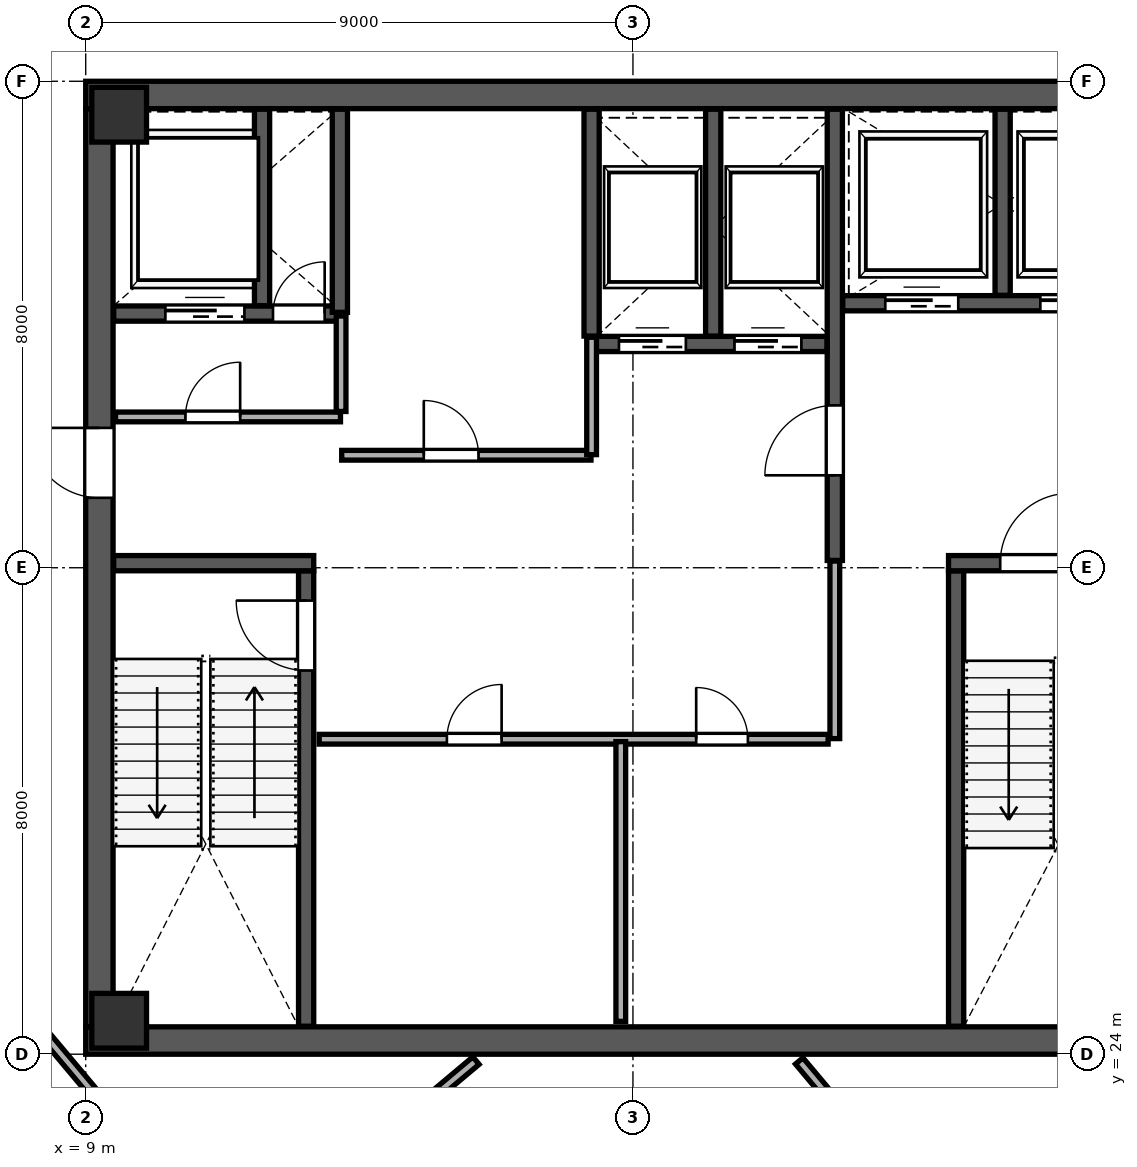
"""IFC4 building model, lengths in metres.
Left out: names, types, materials, properties, quantities, classifications, styles, units other than length and angle.
Written with IfcOpenShell. Run it as: python <this file> out.ifc"""

import sys

from ifc_helpers import new_model, si_unit, direction, frame, frame_2d, origin, origin_2d, place, context, subcontext, project, spatial, rectangle, extrude, source, transform, mapped, element, fill, save


model = new_model("IFC4")
c1 = context("Model", 3, precision=1e-05, world=origin(), true_north=direction((0.0, 1.0)))
c2 = subcontext(c1, "Body", "Model", "MODEL_VIEW")
j1 = project(units=[si_unit("LENGTHUNIT", "METRE"), si_unit("PLANEANGLEUNIT", "RADIAN")], contexts=[c1])
p1 = place(None, origin())
s1 = spatial("IfcSite", under=j1, at=p1, CompositionType="ELEMENT")
p2 = place(p1, origin())
s2 = spatial("IfcBuilding", under=s1, at=p2, CompositionType="ELEMENT")
p3 = place(p2, frame((0.0, 0.0, 271.0)))
s3 = spatial("IfcBuildingStorey", under=s2, at=p3, CompositionType="ELEMENT", Elevation=271.0)
m1 = source(origin(), c2, "Body", "SweptSolid", [
    extrude(rectangle(XDim=0.9, YDim=0.9, at=origin_2d()), origin(), (0.0, 0.0, 1.0), 4.198),
])
for number, where, z_axis, x_axis in (
    (1, (9.55, 24.55, 0.001), (0.0, 0.0, 1.0), (1.0, 0.0, 0.0)),
    (2, (9.55, 39.45, 0.001), (0.0, 0.0, 1.0), (1.0, 0.0, 0.0)),
):
    element("IfcColumn", number, at=place(p3, frame(where, z_axis=z_axis, x_axis=x_axis)), inside=s3, PredefinedType="COLUMN", context=c2, shape_type="MappedRepresentation", body=[
        mapped(m1, transform((0.0, 0.0, 0.0), scale=1.0)),
    ])
p4 = place(p3, frame((9.225, 24.45, 0.0), z_axis=(0.0, 0.0, 1.0), x_axis=(0.0, 1.0, 0.0)))
e3 = element("IfcWall", 3, at=p4, inside=s3, PredefinedType="SHEAR", context=c2, shape_type="SweptSolid", body=[
    extrude(rectangle(XDim=15.1, YDim=0.45, at=frame_2d((7.55, 0.0))), origin(), (0.0, 0.0, 1.0), 3.96),
])
p5 = place(p4, frame((8.7, 0.0, 0.0)))
e4 = element("IfcOpeningElement", 4, at=p5, cuts=e3, PredefinedType="OPENING", context=c2, shape_type="SweptSolid", body=[
    extrude(rectangle(XDim=1.15, YDim=2.2, at=frame_2d((0.575, 1.1))), frame((0.0, 0.235, 0.0), z_axis=(0.0, -1.0, 0.0), x_axis=(1.0, 0.0, 0.0)), (0.0, 0.0, 1.0), 0.47),
])
for number, where, z_axis, x_axis in (
    (5, (9.0, 24.225, 0.0), (0.0, 0.0, 1.0), (1.0, 0.0, 0.0)),
    (6, (9.0, 39.775, 0.0), (0.0, 0.0, 1.0), (1.0, 0.0, 0.0)),
):
    element("IfcWall", number, at=place(p3, frame(where, z_axis=z_axis, x_axis=x_axis)), inside=s3, PredefinedType="SHEAR", context=c2, shape_type="SweptSolid", body=[
        extrude(rectangle(XDim=18.0, YDim=0.45, at=frame_2d((9.0, 0.0))), origin(), (0.0, 0.0, 1.0), 3.96),
    ])
p6 = place(p3, frame((12.625, 24.46, 0.0), z_axis=(0.0, 0.0, 1.0), x_axis=(0.0, 1.0, 0.0)))
e7 = element("IfcWall", 7, at=p6, inside=s3, PredefinedType="SHEAR", context=c2, shape_type="SweptSolid", body=[
    extrude(rectangle(XDim=7.49, YDim=0.25, at=frame_2d((3.745, 0.0))), origin(), (0.0, 0.0, 1.0), 3.96),
])
p7 = place(p6, frame((5.85, 0.0, 0.0)))
e8 = element("IfcOpeningElement", 8, at=p7, cuts=e7, PredefinedType="OPENING", context=c2, shape_type="SweptSolid", body=[
    extrude(rectangle(XDim=1.15, YDim=2.2, at=frame_2d((0.575, 1.1))), frame((0.0, 0.135, 0.0), z_axis=(0.0, -1.0, 0.0), x_axis=(1.0, 0.0, 0.0)), (0.0, 0.0, 1.0), 0.27),
])
p8 = place(p3, frame((9.46, 32.075, 0.0), z_axis=(0.0, 0.0, 1.0), x_axis=(1.0, 0.0, 0.0)))
e9 = element("IfcWall", 9, at=p8, inside=s3, PredefinedType="SHEAR", context=c2, shape_type="SweptSolid", body=[
    extrude(rectangle(XDim=3.29, YDim=0.25, at=frame_2d((1.645, 0.0))), origin(), (0.0, 0.0, 1.0), 3.96),
])
p9 = place(p3, frame((23.315, 24.46, 0.0), z_axis=(0.0, 0.0, 1.0), x_axis=(0.0, 1.0, 0.0)))
e10 = element("IfcWall", 10, at=p9, inside=s3, PredefinedType="SHEAR", context=c2, shape_type="SweptSolid", body=[
    extrude(rectangle(XDim=7.49, YDim=0.25, at=frame_2d((3.745, 0.0))), origin(), (0.0, 0.0, 1.0), 3.96),
])
p10 = place(p3, frame((23.19, 32.075, 0.0), z_axis=(0.0, 0.0, 1.0), x_axis=(1.0, 0.0, 0.0)))
e11 = element("IfcWall", 11, at=p10, inside=s3, PredefinedType="SHEAR", context=c2, shape_type="SweptSolid", body=[
    extrude(rectangle(XDim=3.35, YDim=0.25, at=frame_2d((1.675, 0.0))), origin(), (0.0, 0.0, 1.0), 3.96),
])
p11 = place(p10, frame((0.85, 0.0, 0.0)))
e12 = element("IfcOpeningElement", 12, at=p11, cuts=e11, PredefinedType="OPENING", context=c2, shape_type="SweptSolid", body=[
    extrude(rectangle(XDim=1.15, YDim=2.2, at=frame_2d((0.575, 1.1))), frame((0.0, 0.135, 0.0), z_axis=(0.0, -1.0, 0.0), x_axis=(1.0, 0.0, 0.0)), (0.0, 0.0, 1.0), 0.27),
])
p12 = place(p3, frame((21.32, 32.12, 0.0), z_axis=(0.0, 0.0, 1.0), x_axis=(0.0, 1.0, 0.0)))
e13 = element("IfcWall", 13, at=p12, inside=s3, PredefinedType="SHEAR", context=c2, shape_type="SweptSolid", body=[
    extrude(rectangle(XDim=7.42, YDim=0.25, at=frame_2d((3.71, 0.0))), origin(), (0.0, 0.0, 1.0), 3.96),
])
p13 = place(p12, frame((1.4, 0.0, 0.0)))
e14 = element("IfcOpeningElement", 14, at=p13, cuts=e13, PredefinedType="OPENING", context=c2, shape_type="SweptSolid", body=[
    extrude(rectangle(XDim=1.15, YDim=2.2, at=frame_2d((0.575, 1.1))), frame((0.0, 0.135, 0.0), z_axis=(0.0, -1.0, 0.0), x_axis=(1.0, 0.0, 0.0)), (0.0, 0.0, 1.0), 0.27),
])
p14 = place(p3, frame((9.46, 36.18, 0.0), z_axis=(0.0, 0.0, 1.0), x_axis=(1.0, 0.0, 0.0)))
e15 = element("IfcWall", 15, at=p14, inside=s3, PredefinedType="SHEAR", context=c2, shape_type="SweptSolid", body=[
    extrude(rectangle(XDim=3.79, YDim=0.25, at=frame_2d((1.895, 0.0))), origin(), (0.0, 0.0, 1.0), 3.96),
])
p15 = place(p14, frame((2.62, 0.0, 0.0)))
e16 = element("IfcOpeningElement", 16, at=p15, cuts=e15, PredefinedType="OPENING", context=c2, shape_type="SweptSolid", body=[
    extrude(rectangle(XDim=0.85, YDim=2.1, at=frame_2d((0.425, 1.05))), frame((0.0, 0.135, 0.0), z_axis=(0.0, -1.0, 0.0), x_axis=(1.0, 0.0, 0.0)), (0.0, 0.0, 1.0), 0.27),
])
p16 = place(p14, frame((0.85, 0.0, 0.0)))
e17 = element("IfcOpeningElement", 17, at=p16, cuts=e15, PredefinedType="OPENING", context=c2, shape_type="SweptSolid", body=[
    extrude(rectangle(XDim=1.3, YDim=2.25, at=frame_2d((0.65, 1.125))), frame((0.0, 0.135, 0.0), z_axis=(0.0, -1.0, 0.0), x_axis=(1.0, 0.0, 0.0)), (0.0, 0.0, 1.0), 0.27),
])
p17 = place(p3, frame((11.9, 36.31, 0.0), z_axis=(0.0, 0.0, 1.0), x_axis=(0.0, 1.0, 0.0)))
e18 = element("IfcWall", 18, at=p17, inside=s3, PredefinedType="SHEAR", context=c2, shape_type="SweptSolid", body=[
    extrude(rectangle(XDim=3.23, YDim=0.25, at=frame_2d((1.615, 0.0))), origin(), (0.0, 0.0, 1.0), 3.96),
])
p18 = place(p3, frame((21.45, 36.35, 0.0), z_axis=(0.0, 0.0, 1.0), x_axis=(1.0, 0.0, 0.0)))
e19 = element("IfcWall", 19, at=p18, inside=s3, PredefinedType="SHEAR", context=c2, shape_type="SweptSolid", body=[
    extrude(rectangle(XDim=5.09, YDim=0.25, at=frame_2d((2.545, 0.0))), origin(), (0.0, 0.0, 1.0), 3.96),
])
p19 = place(p18, frame((0.7, 0.0, 0.0)))
e20 = element("IfcOpeningElement", 20, at=p19, cuts=e19, PredefinedType="OPENING", context=c2, shape_type="SweptSolid", body=[
    extrude(rectangle(XDim=1.2, YDim=2.2, at=frame_2d((0.6, 1.1))), frame((0.0, 0.135, 0.0), z_axis=(0.0, -1.0, 0.0), x_axis=(1.0, 0.0, 0.0)), (0.0, 0.0, 1.0), 0.27),
])
p20 = place(p18, frame((3.25, 0.0, 0.0)))
e21 = element("IfcOpeningElement", 21, at=p20, cuts=e19, PredefinedType="OPENING", context=c2, shape_type="SweptSolid", body=[
    extrude(rectangle(XDim=1.2, YDim=2.2, at=frame_2d((0.6, 1.1))), frame((0.0, 0.135, 0.0), z_axis=(0.0, -1.0, 0.0), x_axis=(1.0, 0.0, 0.0)), (0.0, 0.0, 1.0), 0.27),
])
p21 = place(p3, frame((24.08, 36.48, 0.0), z_axis=(0.0, 0.0, 1.0), x_axis=(0.0, 1.0, 0.0)))
e22 = element("IfcWall", 22, at=p21, inside=s3, PredefinedType="SHEAR", context=c2, shape_type="SweptSolid", body=[
    extrude(rectangle(XDim=3.06, YDim=0.25, at=frame_2d((1.53, 0.0))), origin(), (0.0, 0.0, 1.0), 3.96),
])
p22 = place(p3, frame((13.18, 36.2, 0.0), z_axis=(0.0, 0.0, 1.0), x_axis=(0.0, 1.0, 0.0)))
e23 = element("IfcWall", 23, at=p22, inside=s3, PredefinedType="SHEAR", context=c2, shape_type="SweptSolid", body=[
    extrude(rectangle(XDim=3.34, YDim=0.25, at=frame_2d((1.67, 0.0))), origin(), (0.0, 0.0, 1.0), 3.96),
])
p23 = place(p3, frame((17.32, 35.68, 0.0), z_axis=(0.0, 0.0, 1.0), x_axis=(1.0, 0.0, 0.0)))
e24 = element("IfcWall", 24, at=p23, inside=s3, PredefinedType="SHEAR", context=c2, shape_type="SweptSolid", body=[
    extrude(rectangle(XDim=3.87, YDim=0.25, at=frame_2d((1.935, 0.0))), origin(), (0.0, 0.0, 1.0), 3.96),
])
p24 = place(p23, frame((0.45, 0.0, 0.0)))
e25 = element("IfcOpeningElement", 25, at=p24, cuts=e24, PredefinedType="OPENING", context=c2, shape_type="SweptSolid", body=[
    extrude(rectangle(XDim=1.1, YDim=2.2, at=frame_2d((0.55, 1.1))), frame((0.0, 0.135, 0.0), z_axis=(0.0, -1.0, 0.0), x_axis=(1.0, 0.0, 0.0)), (0.0, 0.0, 1.0), 0.27),
])
p25 = place(p23, frame((2.35, 0.0, 0.0)))
e26 = element("IfcOpeningElement", 26, at=p25, cuts=e24, PredefinedType="OPENING", context=c2, shape_type="SweptSolid", body=[
    extrude(rectangle(XDim=1.1, YDim=2.2, at=frame_2d((0.55, 1.1))), frame((0.0, 0.135, 0.0), z_axis=(0.0, -1.0, 0.0), x_axis=(1.0, 0.0, 0.0)), (0.0, 0.0, 1.0), 0.27),
])
for number, where, z_axis, x_axis in (
    (27, (17.32, 35.81, 0.0), (0.0, 0.0, 1.0), (0.0, 1.0, 0.0)),
    (28, (19.32, 35.81, 0.0), (0.0, 0.0, 1.0), (0.0, 1.0, 0.0)),
):
    element("IfcWall", number, at=place(p3, frame(where, z_axis=z_axis, x_axis=x_axis)), inside=s3, PredefinedType="SHEAR", context=c2, shape_type="SweptSolid", body=[
        extrude(rectangle(XDim=3.73, YDim=0.25, at=frame_2d((1.865, 0.0))), origin(), (0.0, 0.0, 1.0), 3.96),
    ])
p26 = place(p3, frame((9.49, 34.48, 0.0), z_axis=(0.0, 0.0, 1.0), x_axis=(1.0, 0.0, 0.0)))
e29 = element("IfcWall", 29, at=p26, inside=s3, PredefinedType="PARTITIONING", context=c2, shape_type="SweptSolid", body=[
    extrude(rectangle(XDim=3.7, YDim=0.16, at=frame_2d((1.85, 0.0))), origin(), (0.0, 0.0, 1.0), 3.96),
])
p27 = place(p26, frame((1.15, 0.0, 0.0)))
e30 = element("IfcOpeningElement", 30, at=p27, cuts=e29, PredefinedType="OPENING", context=c2, shape_type="SweptSolid", body=[
    extrude(rectangle(XDim=0.9, YDim=2.15, at=frame_2d((0.45, 1.075))), frame((0.0, 0.09, 0.0), z_axis=(0.0, -1.0, 0.0), x_axis=(1.0, 0.0, 0.0)), (0.0, 0.0, 1.0), 0.18),
])
p28 = place(p3, frame((13.2, 34.57, 0.0), z_axis=(0.0, 0.0, 1.0), x_axis=(0.0, 1.0, 0.0)))
e31 = element("IfcWall", 31, at=p28, inside=s3, PredefinedType="PARTITIONING", context=c2, shape_type="SweptSolid", body=[
    extrude(rectangle(XDim=1.57, YDim=0.16, at=frame_2d((0.785, 0.0))), origin(), (0.0, 0.0, 1.0), 3.96),
])
p29 = place(p3, frame((13.21, 33.85, 0.0), z_axis=(0.0, 0.0, 1.0), x_axis=(1.0, 0.0, 0.0)))
e32 = element("IfcWall", 32, at=p29, inside=s3, PredefinedType="PARTITIONING", context=c2, shape_type="SweptSolid", body=[
    extrude(rectangle(XDim=4.1, YDim=0.16, at=frame_2d((2.05, 0.0))), origin(), (0.0, 0.0, 1.0), 3.96),
])
p30 = place(p29, frame((1.35, 0.0, 0.0)))
e33 = element("IfcOpeningElement", 33, at=p30, cuts=e32, PredefinedType="OPENING", context=c2, shape_type="SweptSolid", body=[
    extrude(rectangle(XDim=0.9, YDim=2.15, at=frame_2d((0.45, 1.075))), frame((0.0, 0.09, 0.0), z_axis=(0.0, -1.0, 0.0), x_axis=(1.0, 0.0, 0.0)), (0.0, 0.0, 1.0), 0.18),
])
p31 = place(p3, frame((17.32, 33.86, 0.0), z_axis=(0.0, 0.0, 1.0), x_axis=(0.0, 1.0, 0.0)))
e34 = element("IfcWall", 34, at=p31, inside=s3, PredefinedType="PARTITIONING", context=c2, shape_type="SweptSolid", body=[
    extrude(rectangle(XDim=1.93, YDim=0.16, at=frame_2d((0.965, 0.0))), origin(), (0.0, 0.0, 1.0), 3.96),
])
p32 = place(p3, frame((12.84, 29.18, 0.0), z_axis=(0.0, 0.0, 1.0), x_axis=(1.0, 0.0, 0.0)))
e35 = element("IfcWall", 35, at=p32, inside=s3, PredefinedType="PARTITIONING", context=c2, shape_type="SweptSolid", body=[
    extrude(rectangle(XDim=8.37, YDim=0.16, at=frame_2d((4.185, 0.0))), origin(), (0.0, 0.0, 1.0), 3.96),
])
p33 = place(p32, frame((2.1, 0.0, 0.0)))
e36 = element("IfcOpeningElement", 36, at=p33, cuts=e35, PredefinedType="OPENING", context=c2, shape_type="SweptSolid", body=[
    extrude(rectangle(XDim=0.9, YDim=2.15, at=frame_2d((0.45, 1.075))), frame((0.0, 0.09, 0.0), z_axis=(0.0, -1.0, 0.0), x_axis=(1.0, 0.0, 0.0)), (0.0, 0.0, 1.0), 0.18),
])
p34 = place(p32, frame((6.2, 0.0, 0.0)))
e37 = element("IfcOpeningElement", 37, at=p34, cuts=e35, PredefinedType="OPENING", context=c2, shape_type="SweptSolid", body=[
    extrude(rectangle(XDim=0.85, YDim=2.1, at=frame_2d((0.425, 1.05))), frame((0.0, 0.09, 0.0), z_axis=(0.0, -1.0, 0.0), x_axis=(1.0, 0.0, 0.0)), (0.0, 0.0, 1.0), 0.18),
])
p35 = place(p3, frame((17.8, 24.54, 0.0), z_axis=(0.0, 0.0, 1.0), x_axis=(0.0, 1.0, 0.0)))
e38 = element("IfcWall", 38, at=p35, inside=s3, PredefinedType="PARTITIONING", context=c2, shape_type="SweptSolid", body=[
    extrude(rectangle(XDim=4.6, YDim=0.16, at=frame_2d((2.3, 0.0))), origin(), (0.0, 0.0, 1.0), 3.96),
])
p36 = place(p3, frame((21.32, 29.19, 0.0), z_axis=(0.0, 0.0, 1.0), x_axis=(0.0, 1.0, 0.0)))
e39 = element("IfcWall", 39, at=p36, inside=s3, PredefinedType="PARTITIONING", context=c2, shape_type="SweptSolid", body=[
    extrude(rectangle(XDim=2.92, YDim=0.16, at=frame_2d((1.46, 0.0))), origin(), (0.0, 0.0, 1.0), 3.96),
])
p37 = place(p3, frame((4.002, 29.471, 0.0), z_axis=(0.0, 0.0, 1.0), x_axis=(0.642802048813, -0.766032327021, 0.0)))
e40 = element("IfcWall", 40, at=p37, inside=s3, PredefinedType="PARTITIONING", context=c2, shape_type="SweptSolid", body=[
    extrude(rectangle(XDim=11.57, YDim=0.16, at=frame_2d((5.785, 0.0))), origin(), (0.0, 0.0, 1.0), 3.96),
])
p38 = place(p37, frame((1.15, 0.0, 0.0)))
e41 = element("IfcOpeningElement", 41, at=p38, cuts=e40, PredefinedType="OPENING", context=c2, shape_type="SweptSolid", body=[
    extrude(rectangle(XDim=0.95, YDim=2.15, at=frame_2d((0.475, 1.075))), frame((0.0, 0.09, 0.0), z_axis=(0.0, -1.0, 0.0), x_axis=(1.0, 0.0, 0.0)), (0.0, 0.0, 1.0), 0.18),
])
p39 = place(p3, frame((11.495, 20.603, 0.0), z_axis=(0.0, 0.0, 1.0), x_axis=(0.766059769702, 0.642769343734, 0.0)))
e42 = element("IfcWall", 42, at=p39, inside=s3, PredefinedType="PARTITIONING", context=c2, shape_type="SweptSolid", body=[
    extrude(rectangle(XDim=5.121, YDim=0.16, at=frame_2d((2.561, 0.0))), origin(), (0.0, 0.0, 1.0), 3.96),
])
p40 = place(p3, frame((20.734, 23.889, 0.0), z_axis=(0.0, 0.0, 1.0), x_axis=(0.642758145725, -0.766069165353, 0.0)))
e43 = element("IfcWall", 43, at=p40, inside=s3, PredefinedType="PARTITIONING", context=c2, shape_type="SweptSolid", body=[
    extrude(rectangle(XDim=5.609, YDim=0.16, at=frame_2d((2.804, 0.0))), origin(), (0.0, 0.0, 1.0), 3.96),
])
p41 = place(p3, frame((19.528, 51.245, 0.0), z_axis=(0.0, 0.0, 1.0), x_axis=(0.642782364439, -0.766048844374, 0.0)))
e44 = element("IfcWall", 44, at=p41, inside=s3, PredefinedType="PARTITIONING", context=c2, shape_type="SweptSolid", body=[
    extrude(rectangle(XDim=27.34, YDim=0.1, at=frame_2d((13.67, 0.0))), origin(), (0.0, 0.0, 1.0), 3.96),
])
p42 = place(p41, frame((10.8, 0.0, 0.0)))
e45 = element("IfcOpeningElement", 45, at=p42, cuts=e44, PredefinedType="OPENING", context=c2, shape_type="SweptSolid", body=[
    extrude(rectangle(XDim=0.95, YDim=2.15, at=frame_2d((0.475, 1.075))), frame((0.0, 0.06, 0.0), z_axis=(0.0, -1.0, 0.0), x_axis=(1.0, 0.0, 0.0)), (0.0, 0.0, 1.0), 0.12),
])
p43 = place(p3, frame((0.849, 35.624, 0.0), z_axis=(0.0, 0.0, 1.0), x_axis=(0.766042777978, 0.642789594119, 0.0)))
e46 = element("IfcWall", 46, at=p43, inside=s3, PredefinedType="PARTITIONING", context=c2, shape_type="SweptSolid", body=[
    extrude(rectangle(XDim=29.51, YDim=0.115, at=frame_2d((14.755, 0.0))), origin(), (0.0, 0.0, 1.0), 3.96),
])
p44 = place(p43, frame((2.6, 0.0, 0.0)))
e47 = element("IfcOpeningElement", 47, at=p44, cuts=e46, PredefinedType="OPENING", context=c2, shape_type="SweptSolid", body=[
    extrude(rectangle(XDim=0.95, YDim=2.15, at=frame_2d((0.475, 1.075))), frame((0.0, 0.067, 0.0), z_axis=(0.0, -1.0, 0.0), x_axis=(1.0, 0.0, 0.0)), (0.0, 0.0, 1.0), 0.135),
])
m2 = source(origin(), c2, "Body", "SweptSolid", [
    extrude(rectangle(XDim=1.15, YDim=2.2, at=frame_2d((0.575, 1.1))), frame((0.0, 0.025, 0.0), z_axis=(0.0, -1.0, 0.0), x_axis=(1.0, 0.0, 0.0)), (0.0, 0.0, 1.0), 0.05),
])
p45 = place(p7, origin())
e48 = element("IfcDoor", 48, at=p45, inside=s3, OperationType="SINGLE_SWING_RIGHT", PredefinedType="DOOR", context=c2, shape_type="MappedRepresentation", body=[
    mapped(m2, transform((0.0, 0.0, 0.0), scale=1.0)),
])
fill(e8, e48)
m3 = source(origin(), c2, "Body", "SweptSolid", [
    extrude(rectangle(XDim=1.15, YDim=2.2, at=frame_2d((0.575, 1.1))), frame((0.0, 0.025, 0.0), z_axis=(0.0, -1.0, 0.0), x_axis=(1.0, 0.0, 0.0)), (0.0, 0.0, 1.0), 0.05),
])
p46 = place(p13, origin())
e49 = element("IfcDoor", 49, at=p46, inside=s3, OperationType="SINGLE_SWING_LEFT", PredefinedType="DOOR", context=c2, shape_type="MappedRepresentation", body=[
    mapped(m3, transform((0.0, 0.0, 0.0), scale=1.0)),
])
fill(e14, e49)
p47 = place(p11, origin())
e50 = element("IfcDoor", 50, at=p47, inside=s3, OperationType="SINGLE_SWING_RIGHT", PredefinedType="DOOR", context=c2, shape_type="MappedRepresentation", body=[
    mapped(m2, transform((0.0, 0.0, 0.0), scale=1.0)),
])
fill(e12, e50)
p48 = place(p5, origin())
e51 = element("IfcDoor", 51, at=p48, inside=s3, OperationType="SINGLE_SWING_RIGHT", PredefinedType="DOOR", context=c2, shape_type="MappedRepresentation", body=[
    mapped(m3, transform((0.0, 0.0, 0.0), scale=1.0)),
])
fill(e4, e51)
m4 = source(origin(), c2, "Body", "SweptSolid", [
    extrude(rectangle(XDim=0.85, YDim=2.1, at=frame_2d((0.425, 1.05))), frame((0.0, 0.025, 0.0), z_axis=(0.0, -1.0, 0.0), x_axis=(1.0, 0.0, 0.0)), (0.0, 0.0, 1.0), 0.05),
])
p49 = place(p15, origin())
e52 = element("IfcDoor", 52, at=p49, inside=s3, OperationType="SINGLE_SWING_RIGHT", PredefinedType="DOOR", context=c2, shape_type="MappedRepresentation", body=[
    mapped(m4, transform((0.0, 0.0, 0.0), scale=1.0)),
])
fill(e16, e52)
m5 = source(origin(), c2, "Body", "SweptSolid", [
    extrude(rectangle(XDim=1.1, YDim=2.2, at=frame_2d((0.55, 1.1))), frame((0.0, 0.025, 0.0), z_axis=(0.0, -1.0, 0.0), x_axis=(1.0, 0.0, 0.0)), (0.0, 0.0, 1.0), 0.05),
])
p50 = place(p24, origin())
e53 = element("IfcDoor", 53, at=p50, inside=s3, OperationType="SLIDING_TO_LEFT", PredefinedType="DOOR", context=c2, shape_type="MappedRepresentation", body=[
    mapped(m5, transform((0.0, 0.0, 0.0), scale=1.0)),
])
fill(e25, e53)
p51 = place(p25, origin())
e54 = element("IfcDoor", 54, at=p51, inside=s3, OperationType="SLIDING_TO_RIGHT", PredefinedType="DOOR", context=c2, shape_type="MappedRepresentation", body=[
    mapped(m5, transform((0.0, 0.0, 0.0), scale=1.0)),
])
fill(e26, e54)
m6 = source(origin(), c2, "Body", "SweptSolid", [
    extrude(rectangle(XDim=1.2, YDim=2.2, at=frame_2d((0.6, 1.1))), frame((0.0, 0.025, 0.0), z_axis=(0.0, -1.0, 0.0), x_axis=(1.0, 0.0, 0.0)), (0.0, 0.0, 1.0), 0.05),
])
p52 = place(p19, origin())
e55 = element("IfcDoor", 55, at=p52, inside=s3, OperationType="SLIDING_TO_LEFT", PredefinedType="DOOR", context=c2, shape_type="MappedRepresentation", body=[
    mapped(m6, transform((0.0, 0.0, 0.0), scale=1.0)),
])
fill(e20, e55)
p53 = place(p20, origin())
e56 = element("IfcDoor", 56, at=p53, inside=s3, OperationType="SLIDING_TO_RIGHT", PredefinedType="DOOR", context=c2, shape_type="MappedRepresentation", body=[
    mapped(m6, transform((0.0, 0.0, 0.0), scale=1.0)),
])
fill(e21, e56)
m7 = source(origin(), c2, "Body", "SweptSolid", [
    extrude(rectangle(XDim=1.3, YDim=2.25, at=frame_2d((0.65, 1.125))), frame((0.0, 0.025, 0.0), z_axis=(0.0, -1.0, 0.0), x_axis=(1.0, 0.0, 0.0)), (0.0, 0.0, 1.0), 0.05),
])
p54 = place(p16, origin())
e57 = element("IfcDoor", 57, at=p54, inside=s3, OperationType="SLIDING_TO_LEFT", PredefinedType="DOOR", context=c2, shape_type="MappedRepresentation", body=[
    mapped(m7, transform((0.0, 0.0, 0.0), scale=1.0)),
])
fill(e17, e57)
m8 = source(origin(), c2, "Body", "SweptSolid", [
    extrude(rectangle(XDim=0.9, YDim=2.15, at=frame_2d((0.45, 1.075))), frame((0.0, 0.025, 0.0), z_axis=(0.0, -1.0, 0.0), x_axis=(1.0, 0.0, 0.0)), (0.0, 0.0, 1.0), 0.05),
])
p55 = place(p27, origin())
e58 = element("IfcDoor", 58, at=p55, inside=s3, OperationType="SINGLE_SWING_RIGHT", PredefinedType="DOOR", context=c2, shape_type="MappedRepresentation", body=[
    mapped(m8, transform((0.0, 0.0, 0.0), scale=1.0)),
])
fill(e30, e58)
p56 = place(p30, origin())
e59 = element("IfcDoor", 59, at=p56, inside=s3, OperationType="SINGLE_SWING_LEFT", PredefinedType="DOOR", context=c2, shape_type="MappedRepresentation", body=[
    mapped(m8, transform((0.0, 0.0, 0.0), scale=1.0)),
])
fill(e33, e59)
p57 = place(p33, origin())
e60 = element("IfcDoor", 60, at=p57, inside=s3, OperationType="SINGLE_SWING_RIGHT", PredefinedType="DOOR", context=c2, shape_type="MappedRepresentation", body=[
    mapped(m8, transform((0.0, 0.0, 0.0), scale=1.0)),
])
fill(e36, e60)
p58 = place(p34, origin())
e61 = element("IfcDoor", 61, at=p58, inside=s3, OperationType="SINGLE_SWING_LEFT", PredefinedType="DOOR", context=c2, shape_type="MappedRepresentation", body=[
    mapped(m4, transform((0.0, 0.0, 0.0), scale=1.0)),
])
fill(e37, e61)
save(model, sys.argv[1])
